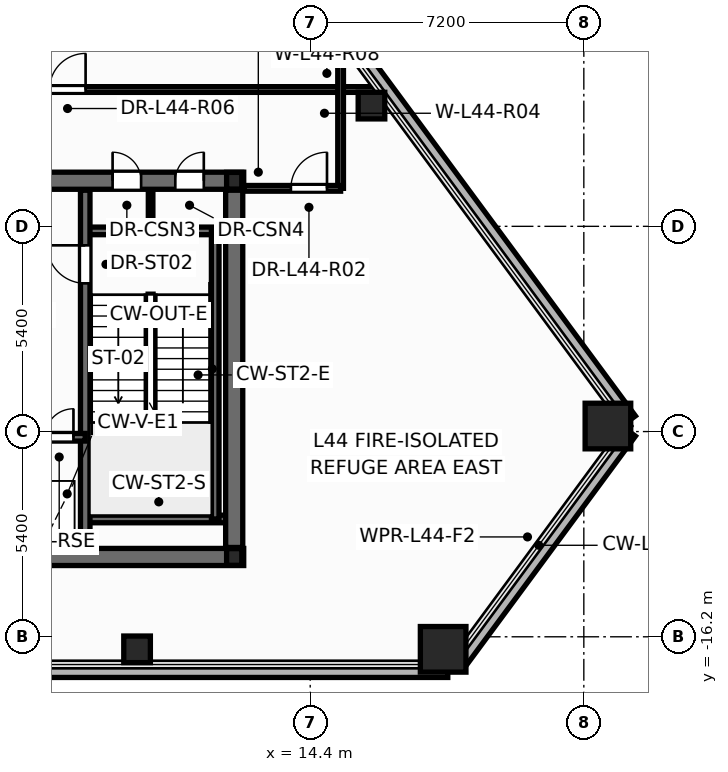
"""IFC4 building model, lengths in metres.
Left out: names, types, materials, properties, quantities, classifications, styles, units other than length and angle.
Written with IfcOpenShell. Run it as: python <this file> out.ifc"""

import sys

from ifc_helpers import new_model, si_unit, direction, frame, frame_2d, origin, origin_2d, place, context, subcontext, project, spatial, rectangle, hollow_rectangle, hollow_circle, i_section, extrude, element, fill, save


model = new_model("IFC4")
c1 = context("Model", 3, precision=1e-05, world=origin(), true_north=direction((0.0, 1.0)))
c2 = subcontext(c1, "Body", "Model", "MODEL_VIEW")
j1 = project(units=[si_unit("LENGTHUNIT", "METRE"), si_unit("PLANEANGLEUNIT", "RADIAN")], contexts=[c1])
p1 = place(None, origin())
s1 = spatial("IfcSite", under=j1, at=p1, CompositionType="ELEMENT")
p2 = place(p1, origin())
s2 = spatial("IfcBuilding", under=s1, at=p2, CompositionType="ELEMENT")
p3 = place(p2, frame((0.0, 0.0, 168.9)))
s3 = spatial("IfcBuildingStorey", under=s2, at=p3, CompositionType="ELEMENT", Elevation=168.9)
for number, where, z_axis, x_axis in (
    (1, (17.898, -16.53, 0.0), (0.0, 0.0, 1.0), (1.0, 0.0, 0.0)),
    (2, (22.234, -10.655, 0.0), (0.0, 0.0, 1.0), (1.0, 0.0, 0.0)),
):
    element("IfcColumn", number, at=place(p3, frame(where, z_axis=z_axis, x_axis=x_axis)), inside=s3, PredefinedType="COLUMN", context=c2, shape_type="SweptSolid", body=[
        extrude(hollow_rectangle(XDim=1.2, YDim=1.2, WallThickness=0.055, at=origin_2d()), origin(), (0.0, 0.0, 1.0), 4.8),
    ])
for number, where, z_axis, x_axis in (
    (3, (9.844, -16.53, 0.0), (0.0, 0.0, 1.0), (1.0, 0.0, 0.0)),
    (4, (16.012, -2.223, 0.0), (0.0, 0.0, 1.0), (1.0, 0.0, 0.0)),
):
    element("IfcColumn", number, at=place(p3, frame(where, z_axis=z_axis, x_axis=x_axis)), inside=s3, PredefinedType="COLUMN", context=c2, shape_type="SweptSolid", body=[
        extrude(hollow_circle(Radius=0.35, WallThickness=0.03, at=origin_2d()), origin(), (0.0, 0.0, 1.0), 4.8),
    ])
for number, where, z_axis, x_axis in (
    (5, (12.4, -14.1, 0.0), (0.0, 0.0, 1.0), (1.0, 0.0, 0.0)),
    (6, (12.4, -4.2, 0.0), (0.0, 0.0, 1.0), (1.0, 0.0, 0.0)),
):
    element("IfcColumn", number, at=place(p3, frame(where, z_axis=z_axis, x_axis=x_axis)), inside=s3, PredefinedType="COLUMN", context=c2, shape_type="SweptSolid", body=[
        extrude(i_section(OverallWidth=0.4, OverallDepth=0.44, WebThickness=0.028, FlangeThickness=0.04, at=origin_2d()), origin(), (0.0, 0.0, 1.0), 4.8),
    ])
p4 = place(p3, frame((-18.02, -17.09, -0.2), z_axis=(0.0, 0.0, 1.0), x_axis=(1.0, 0.0, 0.0)))
e7 = element("IfcWall", 7, at=p4, inside=s3, PredefinedType="PARAPET", context=c2, shape_type="SweptSolid", body=[
    extrude(rectangle(XDim=36.041, YDim=0.36, at=frame_2d((18.02, 0.0))), origin(), (0.0, 0.0, 1.0), 0.38),
])
p5 = place(p3, frame((18.276, -16.961, -0.2), z_axis=(0.0, 0.0, 1.0), x_axis=(0.593789738392, 0.804620249919, 0.0)))
e8 = element("IfcWall", 8, at=p5, inside=s3, PredefinedType="PARAPET", context=c2, shape_type="SweptSolid", body=[
    extrude(rectangle(XDim=7.639, YDim=0.36, at=frame_2d((3.82, 0.0))), origin(), (0.0, 0.0, 1.0), 0.38),
])
p6 = place(p3, frame((22.812, -10.495, -0.2), z_axis=(0.0, 0.0, 1.0), x_axis=(-0.593788907914, 0.804620862791, 0.0)))
e9 = element("IfcWall", 9, at=p6, inside=s3, PredefinedType="PARAPET", context=c2, shape_type="SweptSolid", body=[
    extrude(rectangle(XDim=30.276, YDim=0.36, at=frame_2d((15.138, 0.0))), origin(), (0.0, 0.0, 1.0), 0.38),
])
p7 = place(p3, frame((10.2, -5.52, 0.0), z_axis=(0.0, 0.0, 1.0), x_axis=(0.0, 1.0, 0.0)))
e10 = element("IfcWall", 10, at=p7, inside=s3, PredefinedType="PARTITIONING", context=c2, shape_type="SweptSolid", body=[
    extrude(rectangle(XDim=1.12, YDim=0.12, at=frame_2d((0.56, 0.0))), origin(), (0.0, 0.0, 1.0), 4.52),
])
p8 = place(p3, frame((-12.65, -14.1, 0.0), z_axis=(0.0, 0.0, 1.0), x_axis=(1.0, 0.0, 0.0)))
e11 = element("IfcWall", 11, at=p8, inside=s3, PredefinedType="SHEAR", context=c2, shape_type="SweptSolid", body=[
    extrude(rectangle(XDim=25.3, YDim=0.45, at=frame_2d((12.65, 0.0))), origin(), (0.0, 0.0, 1.0), 4.8),
])
p9 = place(p3, frame((-12.65, -4.2, 0.0), z_axis=(0.0, 0.0, 1.0), x_axis=(1.0, 0.0, 0.0)))
e12 = element("IfcWall", 12, at=p9, inside=s3, PredefinedType="SHEAR", context=c2, shape_type="SweptSolid", body=[
    extrude(rectangle(XDim=25.3, YDim=0.45, at=frame_2d((12.65, 0.0))), origin(), (0.0, 0.0, 1.0), 4.8),
])
p10 = place(p9, frame((0.95, 0.0, 0.0)))
e13 = element("IfcOpeningElement", 13, at=p10, cuts=e12, PredefinedType="OPENING", context=c2, shape_type="SweptSolid", body=[
    extrude(rectangle(XDim=0.756, YDim=2.054, at=frame_2d((0.375, 1.027))), frame((0.0, 0.235, 0.0), z_axis=(0.0, -1.0, 0.0), x_axis=(1.0, 0.0, 0.0)), (0.0, 0.0, 1.0), 0.47),
])
p11 = place(p9, frame((2.6, 0.0, 0.0)))
e14 = element("IfcOpeningElement", 14, at=p11, cuts=e12, PredefinedType="OPENING", context=c2, shape_type="SweptSolid", body=[
    extrude(rectangle(XDim=0.756, YDim=2.054, at=frame_2d((0.375, 1.027))), frame((0.0, 0.235, 0.0), z_axis=(0.0, -1.0, 0.0), x_axis=(1.0, 0.0, 0.0)), (0.0, 0.0, 1.0), 0.47),
])
p12 = place(p9, frame((21.85, 0.0, 0.0)))
e15 = element("IfcOpeningElement", 15, at=p12, cuts=e12, PredefinedType="OPENING", context=c2, shape_type="SweptSolid", body=[
    extrude(rectangle(XDim=0.756, YDim=2.054, at=frame_2d((0.375, 1.027))), frame((0.0, 0.235, 0.0), z_axis=(0.0, -1.0, 0.0), x_axis=(1.0, 0.0, 0.0)), (0.0, 0.0, 1.0), 0.47),
])
p13 = place(p9, frame((23.5, 0.0, 0.0)))
e16 = element("IfcOpeningElement", 16, at=p13, cuts=e12, PredefinedType="OPENING", context=c2, shape_type="SweptSolid", body=[
    extrude(rectangle(XDim=0.756, YDim=2.054, at=frame_2d((0.375, 1.027))), frame((0.0, 0.235, 0.0), z_axis=(0.0, -1.0, 0.0), x_axis=(1.0, 0.0, 0.0)), (0.0, 0.0, 1.0), 0.47),
])
p14 = place(p9, frame((5.85, 0.0, 0.0)))
e17 = element("IfcOpeningElement", 17, at=p14, cuts=e12, PredefinedType="OPENING", context=c2, shape_type="SweptSolid", body=[
    extrude(rectangle(XDim=1.006, YDim=2.104, at=frame_2d((0.5, 1.052))), frame((0.0, 0.235, 0.0), z_axis=(0.0, -1.0, 0.0), x_axis=(1.0, 0.0, 0.0)), (0.0, 0.0, 1.0), 0.47),
])
p15 = place(p9, frame((10.35, 0.0, 0.0)))
e18 = element("IfcOpeningElement", 18, at=p15, cuts=e12, PredefinedType="OPENING", context=c2, shape_type="SweptSolid", body=[
    extrude(rectangle(XDim=1.406, YDim=2.154, at=frame_2d((0.7, 1.077))), frame((0.0, 0.235, 0.0), z_axis=(0.0, -1.0, 0.0), x_axis=(1.0, 0.0, 0.0)), (0.0, 0.0, 1.0), 0.47),
])
p16 = place(p9, frame((18.45, 0.0, 0.0)))
e19 = element("IfcOpeningElement", 19, at=p16, cuts=e12, PredefinedType="OPENING", context=c2, shape_type="SweptSolid", body=[
    extrude(rectangle(XDim=1.006, YDim=2.104, at=frame_2d((0.5, 1.052))), frame((0.0, 0.235, 0.0), z_axis=(0.0, -1.0, 0.0), x_axis=(1.0, 0.0, 0.0)), (0.0, 0.0, 1.0), 0.47),
])
for number, where, z_axis, x_axis in (
    (20, (8.48, -5.52, 0.0), (0.0, 0.0, 1.0), (1.0, 0.0, 0.0)),
    (21, (8.48, -13.1, 0.0), (0.0, 0.0, 1.0), (1.0, 0.0, 0.0)),
):
    element("IfcWall", number, at=place(p3, frame(where, z_axis=z_axis, x_axis=x_axis)), inside=s3, PredefinedType="SOLIDWALL", context=c2, shape_type="SweptSolid", body=[
        extrude(rectangle(XDim=3.87, YDim=0.2, at=frame_2d((1.935, 0.0))), origin(), (0.0, 0.0, 1.0), 4.8),
    ])
p17 = place(p3, frame((11.9, -13.1, 0.0), z_axis=(0.0, 0.0, 1.0), x_axis=(0.0, 1.0, 0.0)))
e22 = element("IfcWall", 22, at=p17, inside=s3, PredefinedType="SOLIDWALL", context=c2, shape_type="SweptSolid", body=[
    extrude(rectangle(XDim=7.58, YDim=0.2, at=frame_2d((3.79, 0.0))), origin(), (0.0, 0.0, 1.0), 4.8),
])
p18 = place(p3, frame((8.48, -13.85, 0.0), z_axis=(0.0, 0.0, 1.0), x_axis=(0.0, 1.0, 0.0)))
e23 = element("IfcWall", 23, at=p18, inside=s3, PredefinedType="SHEAR", context=c2, shape_type="SweptSolid", body=[
    extrude(rectangle(XDim=9.4, YDim=0.25, at=frame_2d((4.7, 0.0))), origin(), (0.0, 0.0, 1.0), 4.8),
])
p19 = place(p18, frame((6.95, 0.0, 0.0)))
e24 = element("IfcOpeningElement", 24, at=p19, cuts=e23, PredefinedType="OPENING", context=c2, shape_type="SweptSolid", body=[
    extrude(rectangle(XDim=1.006, YDim=2.104, at=frame_2d((0.5, 1.052))), frame((0.0, 0.135, 0.0), z_axis=(0.0, -1.0, 0.0), x_axis=(1.0, 0.0, 0.0)), (0.0, 0.0, 1.0), 0.27),
])
p20 = place(p3, frame((5.12, -10.95, 0.0), z_axis=(0.0, 0.0, 1.0), x_axis=(1.0, 0.0, 0.0)))
e25 = element("IfcWall", 25, at=p20, inside=s3, PredefinedType="SOLIDWALL", context=c2, shape_type="SweptSolid", body=[
    extrude(rectangle(XDim=3.36, YDim=0.2, at=frame_2d((1.68, 0.0))), origin(), (0.0, 0.0, 1.0), 4.8),
])
p21 = place(p20, frame((0.42, 0.0, 0.0)))
e26 = element("IfcOpeningElement", 26, at=p21, cuts=e25, PredefinedType="OPENING", context=c2, shape_type="SweptSolid", body=[
    extrude(rectangle(XDim=1.106, YDim=2.104, at=frame_2d((0.55, 1.052))), frame((0.0, 0.11, 0.0), z_axis=(0.0, -1.0, 0.0), x_axis=(1.0, 0.0, 0.0)), (0.0, 0.0, 1.0), 0.22),
])
p22 = place(p20, frame((2.3, 0.0, 0.0)))
e27 = element("IfcOpeningElement", 27, at=p22, cuts=e25, PredefinedType="OPENING", context=c2, shape_type="SweptSolid", body=[
    extrude(rectangle(XDim=0.756, YDim=2.054, at=frame_2d((0.375, 1.027))), frame((0.0, 0.11, 0.0), z_axis=(0.0, -1.0, 0.0), x_axis=(1.0, 0.0, 0.0)), (0.0, 0.0, 1.0), 0.22),
])
p23 = place(p3, frame((12.4, -13.85, 0.0), z_axis=(0.0, 0.0, 1.0), x_axis=(0.0, 1.0, 0.0)))
e28 = element("IfcWall", 28, at=p23, inside=s3, PredefinedType="SHEAR", context=c2, shape_type="SweptSolid", body=[
    extrude(rectangle(XDim=9.4, YDim=0.45, at=frame_2d((4.7, 0.0))), origin(), (0.0, 0.0, 1.0), 4.8),
])
p24 = place(p3, frame((7.14, -1.8, 0.0), z_axis=(0.0, 0.0, 1.0), x_axis=(1.0, 0.0, 0.0)))
e29 = element("IfcWall", 29, at=p24, inside=s3, PredefinedType="PARTITIONING", context=c2, shape_type="SweptSolid", body=[
    extrude(rectangle(XDim=9.057, YDim=0.15, at=frame_2d((4.529, 0.0))), origin(), (0.0, 0.0, 1.0), 2.485),
])
p25 = place(p24, frame((0.4, 0.0, 0.0)))
e30 = element("IfcOpeningElement", 30, at=p25, cuts=e29, PredefinedType="OPENING", context=c2, shape_type="SweptSolid", body=[
    extrude(rectangle(XDim=0.956, YDim=2.104, at=frame_2d((0.475, 1.052))), frame((0.0, 0.085, 0.0), z_axis=(0.0, -1.0, 0.0), x_axis=(1.0, 0.0, 0.0)), (0.0, 0.0, 1.0), 0.17),
])
p26 = place(p3, frame((15.2, -4.4, 0.0), z_axis=(0.0, 0.0, 1.0), x_axis=(0.0, 1.0, 0.0)))
e31 = element("IfcWall", 31, at=p26, inside=s3, PredefinedType="PARTITIONING", context=c2, shape_type="SweptSolid", body=[
    extrude(rectangle(XDim=3.951, YDim=0.15, at=frame_2d((1.975, 0.0))), origin(), (0.0, 0.0, 1.0), 2.485),
])
p27 = place(p3, frame((12.652, -4.4, 0.0), z_axis=(0.0, 0.0, 1.0), x_axis=(1.0, 0.0, 0.0)))
e32 = element("IfcWall", 32, at=p27, inside=s3, PredefinedType="PARTITIONING", context=c2, shape_type="SweptSolid", body=[
    extrude(rectangle(XDim=2.548, YDim=0.15, at=frame_2d((1.274, 0.0))), origin(), (0.0, 0.0, 1.0), 2.485),
])
p28 = place(p27, frame((1.24, 0.0, 0.0)))
e33 = element("IfcOpeningElement", 33, at=p28, cuts=e32, PredefinedType="OPENING", context=c2, shape_type="SweptSolid", body=[
    extrude(rectangle(XDim=0.956, YDim=2.104, at=frame_2d((0.475, 1.052))), frame((0.0, 0.085, 0.0), z_axis=(0.0, -1.0, 0.0), x_axis=(1.0, 0.0, 0.0)), (0.0, 0.0, 1.0), 0.17),
])
p29 = place(p19, origin())
e34 = element("IfcDoor", 34, at=p29, inside=s3, OperationType="SINGLE_SWING_RIGHT", PredefinedType="DOOR", context=c2, shape_type="SweptSolid", body=[
    extrude(rectangle(XDim=1.0, YDim=2.1, at=frame_2d((0.5, 1.05))), frame((0.0, 0.025, 0.0), z_axis=(0.0, -1.0, 0.0), x_axis=(1.0, 0.0, 0.0)), (0.0, 0.0, 1.0), 0.05),
])
fill(e24, e34)
p30 = place(p22, origin())
e35 = element("IfcDoor", 35, at=p30, inside=s3, OperationType="SINGLE_SWING_RIGHT", PredefinedType="DOOR", context=c2, shape_type="SweptSolid", body=[
    extrude(rectangle(XDim=0.75, YDim=2.05, at=frame_2d((0.375, 1.025))), frame((0.0, 0.025, 0.0), z_axis=(0.0, -1.0, 0.0), x_axis=(1.0, 0.0, 0.0)), (0.0, 0.0, 1.0), 0.05),
])
fill(e27, e35)
p31 = place(p12, origin())
e36 = element("IfcDoor", 36, at=p31, inside=s3, OperationType="SINGLE_SWING_LEFT", PredefinedType="DOOR", context=c2, shape_type="SweptSolid", body=[
    extrude(rectangle(XDim=0.75, YDim=2.05, at=frame_2d((0.375, 1.025))), frame((0.0, 0.025, 0.0), z_axis=(0.0, -1.0, 0.0), x_axis=(1.0, 0.0, 0.0)), (0.0, 0.0, 1.0), 0.05),
])
fill(e15, e36)
p32 = place(p13, origin())
e37 = element("IfcDoor", 37, at=p32, inside=s3, OperationType="SINGLE_SWING_RIGHT", PredefinedType="DOOR", context=c2, shape_type="SweptSolid", body=[
    extrude(rectangle(XDim=0.75, YDim=2.05, at=frame_2d((0.375, 1.025))), frame((0.0, 0.025, 0.0), z_axis=(0.0, -1.0, 0.0), x_axis=(1.0, 0.0, 0.0)), (0.0, 0.0, 1.0), 0.05),
])
fill(e16, e37)
p33 = place(p28, origin())
e38 = element("IfcDoor", 38, at=p33, inside=s3, OperationType="SINGLE_SWING_RIGHT", PredefinedType="DOOR", context=c2, shape_type="SweptSolid", body=[
    extrude(rectangle(XDim=0.95, YDim=2.1, at=frame_2d((0.475, 1.05))), frame((0.0, 0.025, 0.0), z_axis=(0.0, -1.0, 0.0), x_axis=(1.0, 0.0, 0.0)), (0.0, 0.0, 1.0), 0.05),
])
fill(e33, e38)
p34 = place(p25, origin())
e39 = element("IfcDoor", 39, at=p34, inside=s3, OperationType="SINGLE_SWING_RIGHT", PredefinedType="DOOR", context=c2, shape_type="SweptSolid", body=[
    extrude(rectangle(XDim=0.95, YDim=2.1, at=frame_2d((0.475, 1.05))), frame((0.0, 0.025, 0.0), z_axis=(0.0, -1.0, 0.0), x_axis=(1.0, 0.0, 0.0)), (0.0, 0.0, 1.0), 0.05),
])
fill(e30, e39)
save(model, sys.argv[1])
